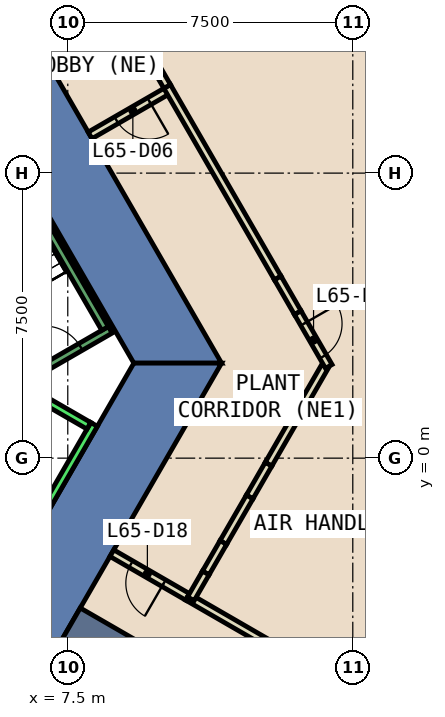
"""IFC4 building model, lengths in metres.
Left out: names, types, materials, properties, quantities, classifications, styles, units other than length and angle.
Written with IfcOpenShell. Run it as: python <this file> out.ifc"""

import sys

from ifc_helpers import new_model, si_unit, direction, frame, frame_2d, origin, place, context, subcontext, project, spatial, polyline, rectangle, outline, extrude, element, fill, save


model = new_model("IFC4")
c1 = context("Model", 3, precision=1e-05, world=origin(), true_north=direction((0.0, 1.0)))
c2 = subcontext(c1, "Body", "Model", "MODEL_VIEW")
j1 = project(units=[si_unit("LENGTHUNIT", "METRE"), si_unit("PLANEANGLEUNIT", "RADIAN")], contexts=[c1])
p1 = place(None, origin())
s1 = spatial("IfcSite", under=j1, at=p1, CompositionType="ELEMENT")
p2 = place(p1, origin())
s2 = spatial("IfcBuilding", under=s1, at=p2, CompositionType="ELEMENT")
p3 = place(p2, frame((0.0, 0.0, 281.0)))
s3 = spatial("IfcBuildingStorey", under=s2, at=p3, CompositionType="ELEMENT", Elevation=281.0)
p4 = place(p3, frame((0.0, 0.0, -0.6)))
e1 = element("IfcWall", 1, at=p4, inside=s3, PredefinedType="SHEAR", context=c2, shape_type="SweptSolid", body=[
    extrude(outline(polyline([(6.786, 10.747), (5.054, 9.747), (9.238, 2.5), (11.547, 2.5), (6.786, 10.747)])), origin(), (0.0, 0.0, 1.0), 5.4),
])
p5 = place(p3, frame((0.0, 0.0, -0.6)))
e2 = element("IfcWall", 2, at=p5, inside=s3, PredefinedType="SHEAR", context=c2, shape_type="SweptSolid", body=[
    extrude(outline(polyline([(5.774, -7.5), (11.547, 2.5), (9.238, 2.5), (4.619, -5.5), (5.774, -7.5)])), origin(), (0.0, 0.0, 1.0), 5.4),
])
p6 = place(p3, frame((7.578, -4.375, 0.0), z_axis=(0.0, 0.0, 1.0), x_axis=(0.866020754303, -0.500008053052, 0.0)))
e3 = element("IfcWall", 3, at=p6, inside=s3, PredefinedType="SHEAR", context=c2, shape_type="SweptSolid", body=[
    extrude(rectangle(XDim=20.374, YDim=1.0, at=frame_2d((10.187, 0.0))), origin(), (0.0, 0.0, 1.0), 4.8),
])
p7 = place(p3, frame((10.652, -3.65, 0.0), z_axis=(0.0, 0.0, 1.0), x_axis=(-0.866079547155, 0.499906209203, 0.0)))
e4 = element("IfcWall", 4, at=p7, inside=s3, PredefinedType="PARTITIONING", context=c2, shape_type="SweptSolid", body=[
    extrude(rectangle(XDim=2.3, YDim=0.2, at=frame_2d((1.15, 0.0))), origin(), (0.0, 0.0, 1.0), 4.8),
])
p8 = place(p7, frame((0.721, 0.0, 0.0)))
e5 = element("IfcOpeningElement", 5, at=p8, cuts=e4, PredefinedType="OPENING", context=c2, shape_type="SweptSolid", body=[
    extrude(rectangle(XDim=1.0, YDim=2.1, at=frame_2d((0.5, 1.05))), frame((0.0, 0.11, 0.0), z_axis=(0.0, -1.0, 0.0), x_axis=(1.0, 0.0, 0.0)), (0.0, 0.0, 1.0), 0.22),
])
p9 = place(p3, frame((10.652, -3.65, 0.0), z_axis=(0.0, 0.0, 1.0), x_axis=(0.86603131093, -0.499989768384, 0.0)))
e6 = element("IfcWall", 6, at=p9, inside=s3, PredefinedType="PARTITIONING", context=c2, shape_type="SweptSolid", body=[
    extrude(rectangle(XDim=18.104, YDim=0.2, at=frame_2d((9.052, 0.0))), origin(), (0.0, 0.0, 1.0), 4.8),
])
p10 = place(p3, frame((10.165, 9.693, 0.0), z_axis=(0.0, 0.0, 1.0), x_axis=(-0.865955154139, -0.50012165622, 0.0)))
e7 = element("IfcWall", 7, at=p10, inside=s3, PredefinedType="PARTITIONING", context=c2, shape_type="SweptSolid", body=[
    extrude(rectangle(XDim=2.4, YDim=0.2, at=frame_2d((1.2, 0.0))), origin(), (0.0, 0.0, 1.0), 2.4),
])
p11 = place(p10, frame((0.6, 0.0, 0.0)))
e8 = element("IfcOpeningElement", 8, at=p11, cuts=e7, PredefinedType="OPENING", context=c2, shape_type="SweptSolid", body=[
    extrude(rectangle(XDim=1.0, YDim=2.1, at=frame_2d((0.5, 1.05))), frame((0.0, 0.11, 0.0), z_axis=(0.0, -1.0, 0.0), x_axis=(1.0, 0.0, 0.0)), (0.0, 0.0, 1.0), 0.22),
])
p12 = place(p3, frame((9.592, 10.685, 0.0), z_axis=(0.0, 0.0, 1.0), x_axis=(0.500366091518, -0.865813937552, 0.0)))
e9 = element("IfcWall", 9, at=p12, inside=s3, PredefinedType="PARTITIONING", context=c2, shape_type="SweptSolid", body=[
    extrude(rectangle(XDim=0.23, YDim=0.2, at=frame_2d((0.115, 0.0))), origin(), (0.0, 0.0, 1.0), 4.8),
])
p13 = place(p3, frame((14.268, 2.413, 0.0), z_axis=(0.0, 0.0, 1.0), x_axis=(-0.500037910135, -0.866003515251, 0.0)))
e10 = element("IfcWall", 10, at=p13, inside=s3, PredefinedType="PARTITIONING", context=c2, shape_type="SweptSolid", body=[
    extrude(rectangle(XDim=2.97, YDim=0.2, at=frame_2d((1.485, 0.0))), origin(), (0.0, 0.0, 1.0), 4.8),
])
p14 = place(p3, frame((10.115, 9.78, 0.0), z_axis=(0.0, 0.0, 1.0), x_axis=(0.500005696091, -0.86602211512, 0.0)))
e11 = element("IfcWall", 11, at=p14, inside=s3, PredefinedType="PARTITIONING", context=c2, shape_type="SweptSolid", body=[
    extrude(rectangle(XDim=5.82, YDim=0.2, at=frame_2d((2.91, 0.0))), origin(), (0.0, 0.0, 1.0), 2.4),
])
p15 = place(p3, frame((9.707, 10.486, 0.0), z_axis=(0.0, 0.0, 1.0), x_axis=(0.500292562113, -0.865856427068, 0.0)))
e12 = element("IfcWall", 12, at=p15, inside=s3, PredefinedType="PARTITIONING", context=c2, shape_type="SweptSolid", body=[
    extrude(rectangle(XDim=0.815, YDim=0.2, at=frame_2d((0.408, 0.0))), origin(), (0.0, 0.0, 1.0), 2.4),
])
p16 = place(p3, frame((12.783, -0.159, 0.0), z_axis=(0.0, 0.0, 1.0), x_axis=(-0.499517125168, -0.866304012263, 0.0)))
e13 = element("IfcWall", 13, at=p16, inside=s3, PredefinedType="PARTITIONING", context=c2, shape_type="SweptSolid", body=[
    extrude(rectangle(XDim=0.995, YDim=0.2, at=frame_2d((0.498, 0.0))), origin(), (0.0, 0.0, 1.0), 2.4),
])
p17 = place(p3, frame((12.286, -1.021, 0.0), z_axis=(0.0, 0.0, 1.0), x_axis=(-0.500348091332, -0.865824339864, 0.0)))
e14 = element("IfcWall", 14, at=p17, inside=s3, PredefinedType="PARTITIONING", context=c2, shape_type="SweptSolid", body=[
    extrude(rectangle(XDim=1.385, YDim=0.2, at=frame_2d((0.692, 0.0))), origin(), (0.0, 0.0, 1.0), 4.8),
])
p18 = place(p3, frame((11.593, -2.22, 0.0), z_axis=(0.0, 0.0, 1.0), x_axis=(-0.499547203848, -0.866286667984, 0.0)))
e15 = element("IfcWall", 15, at=p18, inside=s3, PredefinedType="PARTITIONING", context=c2, shape_type="SweptSolid", body=[
    extrude(rectangle(XDim=0.925, YDim=0.2, at=frame_2d((0.462, 0.0))), origin(), (0.0, 0.0, 1.0), 2.4),
])
p19 = place(p3, frame((11.131, -3.021, 0.0), z_axis=(0.0, 0.0, 1.0), x_axis=(-0.500090821976, -0.865972961342, 0.0)))
e16 = element("IfcWall", 16, at=p19, inside=s3, PredefinedType="PARTITIONING", context=c2, shape_type="SweptSolid", body=[
    extrude(rectangle(XDim=0.784, YDim=0.2, at=frame_2d((0.392, 0.0))), origin(), (0.0, 0.0, 1.0), 4.8),
])
p20 = place(p3, frame((13.025, 4.74, 0.0), z_axis=(0.0, 0.0, 1.0), x_axis=(0.499548844452, -0.866285721922, 0.0)))
e17 = element("IfcWall", 17, at=p20, inside=s3, PredefinedType="PARTITIONING", context=c2, shape_type="SweptSolid", body=[
    extrude(rectangle(XDim=1.055, YDim=0.2, at=frame_2d((0.528, 0.0))), origin(), (0.0, 0.0, 1.0), 2.4),
])
p21 = place(p3, frame((13.552, 3.826, 0.0), z_axis=(0.0, 0.0, 1.0), x_axis=(0.500098085174, -0.865968766876, 0.0)))
e18 = element("IfcWall", 18, at=p21, inside=s3, PredefinedType="PARTITIONING", context=c2, shape_type="SweptSolid", body=[
    extrude(rectangle(XDim=1.632, YDim=0.2, at=frame_2d((0.816, 0.0))), origin(), (0.0, 0.0, 1.0), 4.8),
])
p22 = place(p21, frame((0.331, 0.0, 0.0)))
e19 = element("IfcOpeningElement", 19, at=p22, cuts=e18, PredefinedType="OPENING", context=c2, shape_type="SweptSolid", body=[
    extrude(rectangle(XDim=1.0, YDim=2.1, at=frame_2d((0.5, 1.05))), frame((0.0, 0.11, 0.0), z_axis=(0.0, -1.0, 0.0), x_axis=(1.0, 0.0, 0.0)), (0.0, 0.0, 1.0), 0.22),
])
p23 = place(p3, frame((14.488, 15.06, 0.0), z_axis=(0.0, 0.0, 1.0), x_axis=(-0.755567874399, -0.65507036811, 0.0)))
e20 = element("IfcWall", 20, at=p23, inside=s3, PredefinedType="PARTITIONING", context=c2, shape_type="SweptSolid", body=[
    extrude(rectangle(XDim=6.647, YDim=0.2, at=frame_2d((3.323, 0.0))), origin(), (0.0, 0.0, 1.0), 4.8),
])
p24 = place(p3, frame((5.492, -3.788, 0.0), z_axis=(0.0, 0.0, 1.0), x_axis=(0.500034260056, 0.866005622828, 0.0)))
e21 = element("IfcWall", 21, at=p24, inside=s3, PredefinedType="STANDARD", context=c2, shape_type="SweptSolid", body=[
    extrude(rectangle(XDim=5.399, YDim=0.2, at=frame_2d((2.7, 0.0))), origin(), (0.0, 0.0, 1.0), 4.8),
])
p25 = place(p3, frame((5.977, 2.052, 0.0), z_axis=(0.0, 0.0, 1.0), x_axis=(0.865973769406, -0.500089422704, 0.0)))
e22 = element("IfcWall", 22, at=p25, inside=s3, PredefinedType="STANDARD", context=c2, shape_type="SweptSolid", body=[
    extrude(rectangle(XDim=2.399, YDim=0.2, at=frame_2d((1.2, 0.0))), origin(), (0.0, 0.0, 1.0), 4.8),
])
p26 = place(p3, frame((4.806, 1.176, 0.0), z_axis=(0.0, 0.0, 1.0), x_axis=(0.866059941101, 0.499940174841, 0.0)))
e23 = element("IfcWall", 23, at=p26, inside=s3, PredefinedType="STANDARD", context=c2, shape_type="SweptSolid", body=[
    extrude(rectangle(XDim=4.4, YDim=0.2, at=frame_2d((2.2, 0.0))), origin(), (0.0, 0.0, 1.0), 4.8),
])
p27 = place(p26, frame((2.4, 0.0, 0.0)))
e24 = element("IfcOpeningElement", 24, at=p27, cuts=e23, PredefinedType="OPENING", context=c2, shape_type="SweptSolid", body=[
    extrude(rectangle(XDim=1.1, YDim=2.2, at=frame_2d((0.55, 1.1))), frame((0.0, 0.11, 0.0), z_axis=(0.0, -1.0, 0.0), x_axis=(1.0, 0.0, 0.0)), (0.0, 0.0, 1.0), 0.22),
])
p28 = place(p3, frame((8.48, 3.412, 0.0), z_axis=(0.0, 0.0, 1.0), x_axis=(-0.499978703459, 0.866037698999, 0.0)))
e25 = element("IfcWall", 25, at=p28, inside=s3, PredefinedType="STANDARD", context=c2, shape_type="SweptSolid", body=[
    extrude(rectangle(XDim=6.9, YDim=0.2, at=frame_2d((3.45, 0.0))), origin(), (0.0, 0.0, 1.0), 4.8),
])
p29 = place(p11, origin())
e26 = element("IfcDoor", 26, at=p29, inside=s3, OperationType="SINGLE_SWING_LEFT", PredefinedType="DOOR", context=c2, shape_type="SweptSolid", body=[
    extrude(rectangle(XDim=1.0, YDim=2.1, at=frame_2d((0.5, 1.05))), frame((0.0, 0.025, 0.0), z_axis=(0.0, -1.0, 0.0), x_axis=(1.0, 0.0, 0.0)), (0.0, 0.0, 1.0), 0.05),
])
fill(e8, e26)
p30 = place(p22, origin())
e27 = element("IfcDoor", 27, at=p30, inside=s3, OperationType="SINGLE_SWING_RIGHT", PredefinedType="DOOR", context=c2, shape_type="SweptSolid", body=[
    extrude(rectangle(XDim=1.0, YDim=2.1, at=frame_2d((0.5, 1.05))), frame((0.0, 0.025, 0.0), z_axis=(0.0, -1.0, 0.0), x_axis=(1.0, 0.0, 0.0)), (0.0, 0.0, 1.0), 0.05),
])
fill(e19, e27)
p31 = place(p8, origin())
e28 = element("IfcDoor", 28, at=p31, inside=s3, OperationType="SINGLE_SWING_LEFT", PredefinedType="DOOR", context=c2, shape_type="SweptSolid", body=[
    extrude(rectangle(XDim=1.0, YDim=2.1, at=frame_2d((0.5, 1.05))), frame((0.0, 0.025, 0.0), z_axis=(0.0, -1.0, 0.0), x_axis=(1.0, 0.0, 0.0)), (0.0, 0.0, 1.0), 0.05),
])
fill(e5, e28)
p32 = place(p27, origin())
e29 = element("IfcDoor", 29, at=p32, inside=s3, OperationType="SINGLE_SWING_LEFT", PredefinedType="DOOR", context=c2, shape_type="SweptSolid", body=[
    extrude(rectangle(XDim=1.1, YDim=2.2, at=frame_2d((0.55, 1.1))), frame((0.0, 0.025, 0.0), z_axis=(0.0, -1.0, 0.0), x_axis=(1.0, 0.0, 0.0)), (0.0, 0.0, 1.0), 0.05),
])
fill(e24, e29)
save(model, sys.argv[1])
